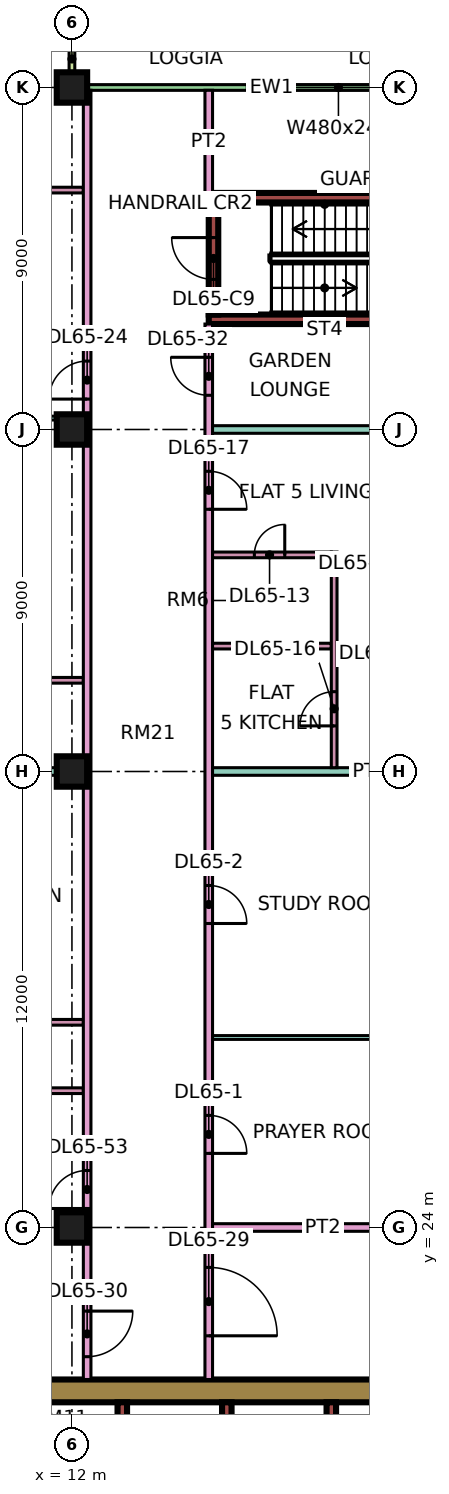
"""IFC4 building model, lengths in metres.
Left out: names, types, materials, properties, quantities, classifications, styles, units other than length and angle.
Written with IfcOpenShell. Run it as: python <this file> out.ifc"""

import sys

from ifc_helpers import new_model, si_unit, direction, frame, frame_2d, origin, origin_2d, place, context, subcontext, project, spatial, rectangle, extrude, element, fill, save


model = new_model("IFC4")
c1 = context("Model", 3, precision=1e-05, world=origin(), true_north=direction((0.0, 1.0)))
c2 = subcontext(c1, "Body", "Model", "MODEL_VIEW")
j1 = project(units=[si_unit("LENGTHUNIT", "METRE"), si_unit("PLANEANGLEUNIT", "RADIAN")], contexts=[c1])
p1 = place(None, origin())
s1 = spatial("IfcSite", under=j1, at=p1, CompositionType="ELEMENT")
p2 = place(p1, origin())
s2 = spatial("IfcBuilding", under=s1, at=p2, CompositionType="ELEMENT")
p3 = place(p2, frame((0.0, 0.0, 280.9)))
s3 = spatial("IfcBuildingStorey", under=s2, at=p3, CompositionType="ELEMENT", Elevation=280.9)
for number, where, z_axis, x_axis in (
    (1, (12.0, 24.0, 0.0), (0.0, 0.0, 1.0), (1.0, 0.0, 0.0)),
    (2, (12.0, 36.0, 0.0), (0.0, 0.0, 1.0), (1.0, 0.0, 0.0)),
    (3, (12.0, 45.0, 0.0), (0.0, 0.0, 1.0), (1.0, 0.0, 0.0)),
    (4, (12.0, 54.0, 0.0), (0.0, 0.0, 1.0), (1.0, 0.0, 0.0)),
):
    element("IfcColumn", number, at=place(p3, frame(where, z_axis=z_axis, x_axis=x_axis)), inside=s3, PredefinedType="COLUMN", context=c2, shape_type="SweptSolid", body=[
        extrude(rectangle(XDim=0.8, YDim=0.8, at=origin_2d()), origin(), (0.0, 0.0, 1.0), 3.75),
    ])
p4 = place(p3, frame((9.0, 19.7, 0.0), z_axis=(0.0, 0.0, 1.0), x_axis=(1.0, 0.0, 0.0)))
e5 = element("IfcWall", 5, at=p4, inside=s3, PredefinedType="SHEAR", context=c2, shape_type="SweptSolid", body=[
    extrude(rectangle(XDim=25.0, YDim=0.6, at=frame_2d((12.5, 0.0))), origin(), (0.0, 0.0, 1.0), 3.75),
])
p5 = place(p4, frame((19.1, 0.0, 0.0)))
e6 = element("IfcOpeningElement", 6, at=p5, cuts=e5, PredefinedType="OPENING", context=c2, shape_type="SweptSolid", body=[
    extrude(rectangle(XDim=1.8, YDim=2.4, at=frame_2d((0.9, 1.2))), frame((0.0, 0.31, 0.0), z_axis=(0.0, -1.0, 0.0), x_axis=(1.0, 0.0, 0.0)), (0.0, 0.0, 1.0), 0.62),
])
p6 = place(p3, frame((13.325, 7.6, 0.0), z_axis=(0.0, 0.0, 1.0), x_axis=(0.0, 1.0, 0.0)))
e7 = element("IfcWall", 7, at=p6, inside=s3, PredefinedType="SHEAR", context=c2, shape_type="SweptSolid", body=[
    extrude(rectangle(XDim=11.8, YDim=0.25, at=frame_2d((5.9, 0.0))), origin(), (0.0, 0.0, 1.0), 3.75),
])
for number, where, z_axis, x_axis in (
    (8, (16.075, 15.8, 0.0), (0.0, 0.0, 1.0), (0.0, 1.0, 0.0)),
    (9, (18.825, 15.8, 0.0), (0.0, 0.0, 1.0), (0.0, 1.0, 0.0)),
):
    element("IfcWall", number, at=place(p3, frame(where, z_axis=z_axis, x_axis=x_axis)), inside=s3, PredefinedType="SHEAR", context=c2, shape_type="SweptSolid", body=[
        extrude(rectangle(XDim=3.6, YDim=0.25, at=frame_2d((1.8, 0.0))), origin(), (0.0, 0.0, 1.0), 3.75),
    ])
for number, where, z_axis, x_axis in (
    (10, (15.6, 47.9, 0.0), (0.0, 0.0, 1.0), (1.0, 0.0, 0.0)),
    (11, (15.6, 51.1, 0.0), (0.0, 0.0, 1.0), (1.0, 0.0, 0.0)),
):
    element("IfcWall", number, at=place(p3, frame(where, z_axis=z_axis, x_axis=x_axis)), inside=s3, PredefinedType="SHEAR", context=c2, shape_type="SweptSolid", body=[
        extrude(rectangle(XDim=7.0, YDim=0.25, at=frame_2d((3.5, 0.0))), origin(), (0.0, 0.0, 1.0), 3.75),
    ])
p7 = place(p3, frame((15.725, 48.025, 0.0), z_axis=(0.0, 0.0, 1.0), x_axis=(0.0, 1.0, 0.0)))
e12 = element("IfcWall", 12, at=p7, inside=s3, PredefinedType="SHEAR", context=c2, shape_type="SweptSolid", body=[
    extrude(rectangle(XDim=2.95, YDim=0.25, at=frame_2d((1.475, 0.0))), origin(), (0.0, 0.0, 1.0), 3.75),
])
p8 = place(p7, frame((0.925, 0.0, 0.0)))
e13 = element("IfcOpeningElement", 13, at=p8, cuts=e12, PredefinedType="OPENING", context=c2, shape_type="SweptSolid", body=[
    extrude(rectangle(XDim=1.1, YDim=2.2, at=frame_2d((0.55, 1.1))), frame((0.0, 0.135, 0.0), z_axis=(0.0, -1.0, 0.0), x_axis=(1.0, 0.0, 0.0)), (0.0, 0.0, 1.0), 0.27),
])
p9 = place(p3, frame((22.425, 54.0, 0.0), z_axis=(0.0, 0.0, 1.0), x_axis=(-1.0, 0.0, 0.0)))
e14 = element("IfcWall", 14, at=p9, inside=s3, PredefinedType="SOLIDWALL", context=c2, shape_type="SweptSolid", body=[
    extrude(rectangle(XDim=10.35, YDim=0.15, at=frame_2d((5.175, 0.0))), origin(), (0.0, 0.0, 1.0), 3.35),
])
p10 = place(p9, frame((1.012, 0.0, 0.45)))
e15 = element("IfcOpeningElement", 15, at=p10, cuts=e14, PredefinedType="OPENING", context=c2, shape_type="SweptSolid", body=[
    extrude(rectangle(XDim=4.8, YDim=2.4, at=frame_2d((2.4, 1.2))), frame((0.0, 0.085, 0.0), z_axis=(0.0, -1.0, 0.0), x_axis=(1.0, 0.0, 0.0)), (0.0, 0.0, 1.0), 0.17),
])
p11 = place(p3, frame((12.0, 55.5, 0.0), z_axis=(0.0, 0.0, 1.0), x_axis=(0.0, -1.0, 0.0)))
e16 = element("IfcWall", 16, at=p11, inside=s3, PredefinedType="SOLIDWALL", context=c2, shape_type="SweptSolid", body=[
    extrude(rectangle(XDim=1.5, YDim=0.15, at=frame_2d((0.75, 0.0))), origin(), (0.0, 0.0, 1.0), 3.35),
])
p12 = place(p3, frame((0.0, 36.0, 0.0), z_axis=(0.0, 0.0, 1.0), x_axis=(1.0, 0.0, 0.0)))
e17 = element("IfcWall", 17, at=p12, inside=s3, PredefinedType="PARTITIONING", context=c2, shape_type="SweptSolid", body=[
    extrude(rectangle(XDim=12.3, YDim=0.2, at=frame_2d((6.15, 0.0))), origin(), (0.0, 0.0, 1.0), 3.35),
])
p13 = place(p3, frame((0.074, 22.4, 0.0), z_axis=(0.0, 0.0, 1.0), x_axis=(1.0, 0.0, 0.0)))
e18 = element("IfcWall", 18, at=p13, inside=s3, PredefinedType="PARTITIONING", context=c2, shape_type="SweptSolid", body=[
    extrude(rectangle(XDim=12.226, YDim=0.2, at=frame_2d((6.113, 0.0))), origin(), (0.0, 0.0, 1.0), 3.35),
])
for number, where, z_axis, x_axis in (
    (19, (7.075, 27.6, 0.0), (0.0, 0.0, 1.0), (1.0, 0.0, 0.0)),
    (20, (7.075, 29.4, 0.0), (0.0, 0.0, 1.0), (1.0, 0.0, 0.0)),
):
    element("IfcWall", number, at=place(p3, frame(where, z_axis=z_axis, x_axis=x_axis)), inside=s3, PredefinedType="PARTITIONING", context=c2, shape_type="SweptSolid", body=[
        extrude(rectangle(XDim=5.225, YDim=0.15, at=frame_2d((2.613, 0.0))), origin(), (0.0, 0.0, 1.0), 3.35),
    ])
p14 = place(p3, frame((7.675, 38.4, 0.0), z_axis=(0.0, 0.0, 1.0), x_axis=(1.0, 0.0, 0.0)))
e21 = element("IfcWall", 21, at=p14, inside=s3, PredefinedType="PARTITIONING", context=c2, shape_type="SweptSolid", body=[
    extrude(rectangle(XDim=4.625, YDim=0.15, at=frame_2d((2.312, 0.0))), origin(), (0.0, 0.0, 1.0), 3.35),
])
p15 = place(p3, frame((7.675, 45.3, 0.0), z_axis=(0.0, 0.0, 1.0), x_axis=(1.0, 0.0, 0.0)))
e22 = element("IfcWall", 22, at=p15, inside=s3, PredefinedType="PARTITIONING", context=c2, shape_type="SweptSolid", body=[
    extrude(rectangle(XDim=4.625, YDim=0.1, at=frame_2d((2.312, 0.0))), origin(), (0.0, 0.0, 1.0), 3.35),
])
for number, where, z_axis, x_axis in (
    (23, (7.675, 47.4, 0.0), (0.0, 0.0, 1.0), (1.0, 0.0, 0.0)),
    (24, (7.675, 51.3, 0.0), (0.0, 0.0, 1.0), (1.0, 0.0, 0.0)),
):
    element("IfcWall", number, at=place(p3, frame(where, z_axis=z_axis, x_axis=x_axis)), inside=s3, PredefinedType="PARTITIONING", context=c2, shape_type="SweptSolid", body=[
        extrude(rectangle(XDim=4.625, YDim=0.15, at=frame_2d((2.312, 0.0))), origin(), (0.0, 0.0, 1.0), 3.35),
    ])
p16 = place(p3, frame((12.4, 20.0, 0.0), z_axis=(0.0, 0.0, 1.0), x_axis=(0.0, 1.0, 0.0)))
e25 = element("IfcWall", 25, at=p16, inside=s3, PredefinedType="PARTITIONING", context=c2, shape_type="SweptSolid", body=[
    extrude(rectangle(XDim=33.926, YDim=0.2, at=frame_2d((16.963, 0.0))), origin(), (0.0, 0.0, 1.0), 3.35),
])
p17 = place(p16, frame((25.8, 0.0, 0.0)))
e26 = element("IfcOpeningElement", 26, at=p17, cuts=e25, PredefinedType="OPENING", context=c2, shape_type="SweptSolid", body=[
    extrude(rectangle(XDim=1.0, YDim=2.1, at=frame_2d((0.5, 1.05))), frame((0.0, 0.11, 0.0), z_axis=(0.0, -1.0, 0.0), x_axis=(1.0, 0.0, 0.0)), (0.0, 0.0, 1.0), 0.22),
])
p18 = place(p16, frame((0.6, 0.0, 0.0)))
e27 = element("IfcOpeningElement", 27, at=p18, cuts=e25, PredefinedType="OPENING", context=c2, shape_type="SweptSolid", body=[
    extrude(rectangle(XDim=1.2, YDim=2.1, at=frame_2d((0.6, 1.05))), frame((0.0, 0.11, 0.0), z_axis=(0.0, -1.0, 0.0), x_axis=(1.0, 0.0, 0.0)), (0.0, 0.0, 1.0), 0.22),
])
p19 = place(p16, frame((4.5, 0.0, 0.0)))
e28 = element("IfcOpeningElement", 28, at=p19, cuts=e25, PredefinedType="OPENING", context=c2, shape_type="SweptSolid", body=[
    extrude(rectangle(XDim=1.0, YDim=2.1, at=frame_2d((0.5, 1.05))), frame((0.0, 0.11, 0.0), z_axis=(0.0, -1.0, 0.0), x_axis=(1.0, 0.0, 0.0)), (0.0, 0.0, 1.0), 0.22),
])
p20 = place(p3, frame((15.6, 20.0, 0.0), z_axis=(0.0, 0.0, 1.0), x_axis=(0.0, 1.0, 0.0)))
e29 = element("IfcWall", 29, at=p20, inside=s3, PredefinedType="PARTITIONING", context=c2, shape_type="SweptSolid", body=[
    extrude(rectangle(XDim=27.775, YDim=0.2, at=frame_2d((13.887, 0.0))), origin(), (0.0, 0.0, 1.0), 3.35),
])
p21 = place(p20, frame((5.95, 0.0, 0.0)))
e30 = element("IfcOpeningElement", 30, at=p21, cuts=e29, PredefinedType="OPENING", context=c2, shape_type="SweptSolid", body=[
    extrude(rectangle(XDim=1.0, YDim=2.1, at=frame_2d((0.5, 1.05))), frame((0.0, 0.11, 0.0), z_axis=(0.0, -1.0, 0.0), x_axis=(1.0, 0.0, 0.0)), (0.0, 0.0, 1.0), 0.22),
])
p22 = place(p20, frame((12.0, 0.0, 0.0)))
e31 = element("IfcOpeningElement", 31, at=p22, cuts=e29, PredefinedType="OPENING", context=c2, shape_type="SweptSolid", body=[
    extrude(rectangle(XDim=1.0, YDim=2.1, at=frame_2d((0.5, 1.05))), frame((0.0, 0.11, 0.0), z_axis=(0.0, -1.0, 0.0), x_axis=(1.0, 0.0, 0.0)), (0.0, 0.0, 1.0), 0.22),
])
p23 = place(p20, frame((22.9, 0.0, 0.0)))
e32 = element("IfcOpeningElement", 32, at=p23, cuts=e29, PredefinedType="OPENING", context=c2, shape_type="SweptSolid", body=[
    extrude(rectangle(XDim=1.0, YDim=2.1, at=frame_2d((0.5, 1.05))), frame((0.0, 0.11, 0.0), z_axis=(0.0, -1.0, 0.0), x_axis=(1.0, 0.0, 0.0)), (0.0, 0.0, 1.0), 0.22),
])
p24 = place(p20, frame((1.15, 0.0, 0.0)))
e33 = element("IfcOpeningElement", 33, at=p24, cuts=e29, PredefinedType="OPENING", context=c2, shape_type="SweptSolid", body=[
    extrude(rectangle(XDim=1.8, YDim=2.1, at=frame_2d((0.9, 1.05))), frame((0.0, 0.11, 0.0), z_axis=(0.0, -1.0, 0.0), x_axis=(1.0, 0.0, 0.0)), (0.0, 0.0, 1.0), 0.22),
])
p25 = place(p20, frame((25.9, 0.0, 0.0)))
e34 = element("IfcOpeningElement", 34, at=p25, cuts=e29, PredefinedType="OPENING", context=c2, shape_type="SweptSolid", body=[
    extrude(rectangle(XDim=1.0, YDim=2.1, at=frame_2d((0.5, 1.05))), frame((0.0, 0.11, 0.0), z_axis=(0.0, -1.0, 0.0), x_axis=(1.0, 0.0, 0.0)), (0.0, 0.0, 1.0), 0.22),
])
p26 = place(p3, frame((15.6, 51.225, 0.0), z_axis=(0.0, 0.0, 1.0), x_axis=(0.0, 1.0, 0.0)))
e35 = element("IfcWall", 35, at=p26, inside=s3, PredefinedType="PARTITIONING", context=c2, shape_type="SweptSolid", body=[
    extrude(rectangle(XDim=2.701, YDim=0.2, at=frame_2d((1.351, 0.0))), origin(), (0.0, 0.0, 1.0), 3.35),
])
p27 = place(p3, frame((15.7, 24.0, 0.0), z_axis=(0.0, 0.0, 1.0), x_axis=(1.0, 0.0, 0.0)))
e36 = element("IfcWall", 36, at=p27, inside=s3, PredefinedType="PARTITIONING", context=c2, shape_type="SweptSolid", body=[
    extrude(rectangle(XDim=5.8, YDim=0.2, at=frame_2d((2.9, 0.0))), origin(), (0.0, 0.0, 1.0), 3.35),
])
p28 = place(p3, frame((15.7, 29.0, 0.0), z_axis=(0.0, 0.0, 1.0), x_axis=(1.0, 0.0, 0.0)))
e37 = element("IfcWall", 37, at=p28, inside=s3, PredefinedType="PARTITIONING", context=c2, shape_type="SweptSolid", body=[
    extrude(rectangle(XDim=5.8, YDim=0.1, at=frame_2d((2.9, 0.0))), origin(), (0.0, 0.0, 1.0), 3.35),
])
p29 = place(p3, frame((15.7, 36.0, 0.0), z_axis=(0.0, 0.0, 1.0), x_axis=(1.0, 0.0, 0.0)))
e38 = element("IfcWall", 38, at=p29, inside=s3, PredefinedType="PARTITIONING", context=c2, shape_type="SweptSolid", body=[
    extrude(rectangle(XDim=8.3, YDim=0.2, at=frame_2d((4.15, 0.0))), origin(), (0.0, 0.0, 1.0), 3.35),
])
p30 = place(p3, frame((15.7, 39.3, 0.0), z_axis=(0.0, 0.0, 1.0), x_axis=(1.0, 0.0, 0.0)))
e39 = element("IfcWall", 39, at=p30, inside=s3, PredefinedType="PARTITIONING", context=c2, shape_type="SweptSolid", body=[
    extrude(rectangle(XDim=3.125, YDim=0.15, at=frame_2d((1.562, 0.0))), origin(), (0.0, 0.0, 1.0), 3.35),
])
p31 = place(p3, frame((15.7, 41.7, 0.0), z_axis=(0.0, 0.0, 1.0), x_axis=(1.0, 0.0, 0.0)))
e40 = element("IfcWall", 40, at=p31, inside=s3, PredefinedType="PARTITIONING", context=c2, shape_type="SweptSolid", body=[
    extrude(rectangle(XDim=3.125, YDim=0.15, at=frame_2d((1.562, 0.0))), origin(), (0.0, 0.0, 1.0), 3.35),
])
p32 = place(p31, frame((1.1, 0.0, 0.0)))
e41 = element("IfcOpeningElement", 41, at=p32, cuts=e40, PredefinedType="OPENING", context=c2, shape_type="SweptSolid", body=[
    extrude(rectangle(XDim=0.8, YDim=2.1, at=frame_2d((0.4, 1.05))), frame((0.0, 0.085, 0.0), z_axis=(0.0, -1.0, 0.0), x_axis=(1.0, 0.0, 0.0)), (0.0, 0.0, 1.0), 0.17),
])
p33 = place(p3, frame((15.7, 45.0, 0.0), z_axis=(0.0, 0.0, 1.0), x_axis=(1.0, 0.0, 0.0)))
e42 = element("IfcWall", 42, at=p33, inside=s3, PredefinedType="PARTITIONING", context=c2, shape_type="SweptSolid", body=[
    extrude(rectangle(XDim=8.226, YDim=0.2, at=frame_2d((4.113, 0.0))), origin(), (0.0, 0.0, 1.0), 3.35),
])
p34 = place(p3, frame((18.9, 36.1, 0.0), z_axis=(0.0, 0.0, 1.0), x_axis=(0.0, 1.0, 0.0)))
e43 = element("IfcWall", 43, at=p34, inside=s3, PredefinedType="PARTITIONING", context=c2, shape_type="SweptSolid", body=[
    extrude(rectangle(XDim=5.675, YDim=0.15, at=frame_2d((2.837, 0.0))), origin(), (0.0, 0.0, 1.0), 3.35),
])
p35 = place(p34, frame((1.1, 0.0, 0.0)))
e44 = element("IfcOpeningElement", 44, at=p35, cuts=e43, PredefinedType="OPENING", context=c2, shape_type="SweptSolid", body=[
    extrude(rectangle(XDim=0.9, YDim=2.1, at=frame_2d((0.45, 1.05))), frame((0.0, 0.085, 0.0), z_axis=(0.0, -1.0, 0.0), x_axis=(1.0, 0.0, 0.0)), (0.0, 0.0, 1.0), 0.17),
])
p36 = place(p10, origin())
e45 = element("IfcWindow", 45, at=p36, inside=s3, PartitioningType="SINGLE_PANEL", PredefinedType="WINDOW", context=c2, shape_type="SweptSolid", body=[
    extrude(rectangle(XDim=4.8, YDim=2.4, at=frame_2d((2.4, 1.2))), frame((0.0, 0.03, 0.0), z_axis=(0.0, -1.0, 0.0), x_axis=(1.0, 0.0, 0.0)), (0.0, 0.0, 1.0), 0.06),
])
fill(e15, e45)
p37 = place(p8, frame((1.1, 0.0, 0.0), z_axis=(0.0, 0.0, 1.0), x_axis=(-1.0, 0.0, 0.0)))
e46 = element("IfcDoor", 46, at=p37, inside=s3, OperationType="SINGLE_SWING_RIGHT", PredefinedType="DOOR", context=c2, shape_type="SweptSolid", body=[
    extrude(rectangle(XDim=1.1, YDim=2.2, at=frame_2d((0.55, 1.1))), frame((0.0, 0.025, 0.0), z_axis=(0.0, -1.0, 0.0), x_axis=(1.0, 0.0, 0.0)), (0.0, 0.0, 1.0), 0.05),
])
fill(e13, e46)
p38 = place(p21, frame((1.0, 0.0, 0.0), z_axis=(0.0, 0.0, 1.0), x_axis=(-1.0, 0.0, 0.0)))
e47 = element("IfcDoor", 47, at=p38, inside=s3, OperationType="SINGLE_SWING_LEFT", PredefinedType="DOOR", context=c2, shape_type="SweptSolid", body=[
    extrude(rectangle(XDim=1.0, YDim=2.1, at=frame_2d((0.5, 1.05))), frame((0.0, 0.025, 0.0), z_axis=(0.0, -1.0, 0.0), x_axis=(1.0, 0.0, 0.0)), (0.0, 0.0, 1.0), 0.05),
])
fill(e30, e47)
p39 = place(p22, frame((1.0, 0.0, 0.0), z_axis=(0.0, 0.0, 1.0), x_axis=(-1.0, 0.0, 0.0)))
e48 = element("IfcDoor", 48, at=p39, inside=s3, OperationType="SINGLE_SWING_LEFT", PredefinedType="DOOR", context=c2, shape_type="SweptSolid", body=[
    extrude(rectangle(XDim=1.0, YDim=2.1, at=frame_2d((0.5, 1.05))), frame((0.0, 0.025, 0.0), z_axis=(0.0, -1.0, 0.0), x_axis=(1.0, 0.0, 0.0)), (0.0, 0.0, 1.0), 0.05),
])
fill(e31, e48)
p40 = place(p32, frame((0.8, 0.0, 0.0), z_axis=(0.0, 0.0, 1.0), x_axis=(-1.0, 0.0, 0.0)))
e49 = element("IfcDoor", 49, at=p40, inside=s3, OperationType="SINGLE_SWING_RIGHT", PredefinedType="DOOR", context=c2, shape_type="SweptSolid", body=[
    extrude(rectangle(XDim=0.8, YDim=2.1, at=frame_2d((0.4, 1.05))), frame((0.0, 0.025, 0.0), z_axis=(0.0, -1.0, 0.0), x_axis=(1.0, 0.0, 0.0)), (0.0, 0.0, 1.0), 0.05),
])
fill(e41, e49)
p41 = place(p35, origin())
e50 = element("IfcDoor", 50, at=p41, inside=s3, OperationType="SINGLE_SWING_LEFT", PredefinedType="DOOR", context=c2, shape_type="SweptSolid", body=[
    extrude(rectangle(XDim=0.9, YDim=2.1, at=frame_2d((0.45, 1.05))), frame((0.0, 0.025, 0.0), z_axis=(0.0, -1.0, 0.0), x_axis=(1.0, 0.0, 0.0)), (0.0, 0.0, 1.0), 0.05),
])
fill(e44, e50)
p42 = place(p23, frame((1.0, 0.0, 0.0), z_axis=(0.0, 0.0, 1.0), x_axis=(-1.0, 0.0, 0.0)))
e51 = element("IfcDoor", 51, at=p42, inside=s3, OperationType="SINGLE_SWING_LEFT", PredefinedType="DOOR", context=c2, shape_type="SweptSolid", body=[
    extrude(rectangle(XDim=1.0, YDim=2.1, at=frame_2d((0.5, 1.05))), frame((0.0, 0.025, 0.0), z_axis=(0.0, -1.0, 0.0), x_axis=(1.0, 0.0, 0.0)), (0.0, 0.0, 1.0), 0.05),
])
fill(e32, e51)
p43 = place(p17, origin())
e52 = element("IfcDoor", 52, at=p43, inside=s3, OperationType="SINGLE_SWING_LEFT", PredefinedType="DOOR", context=c2, shape_type="SweptSolid", body=[
    extrude(rectangle(XDim=1.0, YDim=2.1, at=frame_2d((0.5, 1.05))), frame((0.0, 0.025, 0.0), z_axis=(0.0, -1.0, 0.0), x_axis=(1.0, 0.0, 0.0)), (0.0, 0.0, 1.0), 0.05),
])
fill(e26, e52)
p44 = place(p24, frame((1.8, 0.0, 0.0), z_axis=(0.0, 0.0, 1.0), x_axis=(-1.0, 0.0, 0.0)))
e53 = element("IfcDoor", 53, at=p44, inside=s3, OperationType="DOUBLE_DOOR_SINGLE_SWING", PredefinedType="DOOR", context=c2, shape_type="SweptSolid", body=[
    extrude(rectangle(XDim=1.8, YDim=2.1, at=frame_2d((0.9, 1.05))), frame((0.0, 0.025, 0.0), z_axis=(0.0, -1.0, 0.0), x_axis=(1.0, 0.0, 0.0)), (0.0, 0.0, 1.0), 0.05),
])
fill(e33, e53)
p45 = place(p18, origin())
e54 = element("IfcDoor", 54, at=p45, inside=s3, OperationType="SINGLE_SWING_RIGHT", PredefinedType="DOOR", context=c2, shape_type="SweptSolid", body=[
    extrude(rectangle(XDim=1.2, YDim=2.1, at=frame_2d((0.6, 1.05))), frame((0.0, 0.025, 0.0), z_axis=(0.0, -1.0, 0.0), x_axis=(1.0, 0.0, 0.0)), (0.0, 0.0, 1.0), 0.05),
])
fill(e27, e54)
p46 = place(p25, frame((1.0, 0.0, 0.0), z_axis=(0.0, 0.0, 1.0), x_axis=(-1.0, 0.0, 0.0)))
e55 = element("IfcDoor", 55, at=p46, inside=s3, OperationType="SINGLE_SWING_RIGHT", PredefinedType="DOOR", context=c2, shape_type="SweptSolid", body=[
    extrude(rectangle(XDim=1.0, YDim=2.1, at=frame_2d((0.5, 1.05))), frame((0.0, 0.025, 0.0), z_axis=(0.0, -1.0, 0.0), x_axis=(1.0, 0.0, 0.0)), (0.0, 0.0, 1.0), 0.05),
])
fill(e34, e55)
p47 = place(p19, origin())
e56 = element("IfcDoor", 56, at=p47, inside=s3, OperationType="SINGLE_SWING_LEFT", PredefinedType="DOOR", context=c2, shape_type="SweptSolid", body=[
    extrude(rectangle(XDim=1.0, YDim=2.1, at=frame_2d((0.5, 1.05))), frame((0.0, 0.025, 0.0), z_axis=(0.0, -1.0, 0.0), x_axis=(1.0, 0.0, 0.0)), (0.0, 0.0, 1.0), 0.05),
])
fill(e28, e56)
save(model, sys.argv[1])
